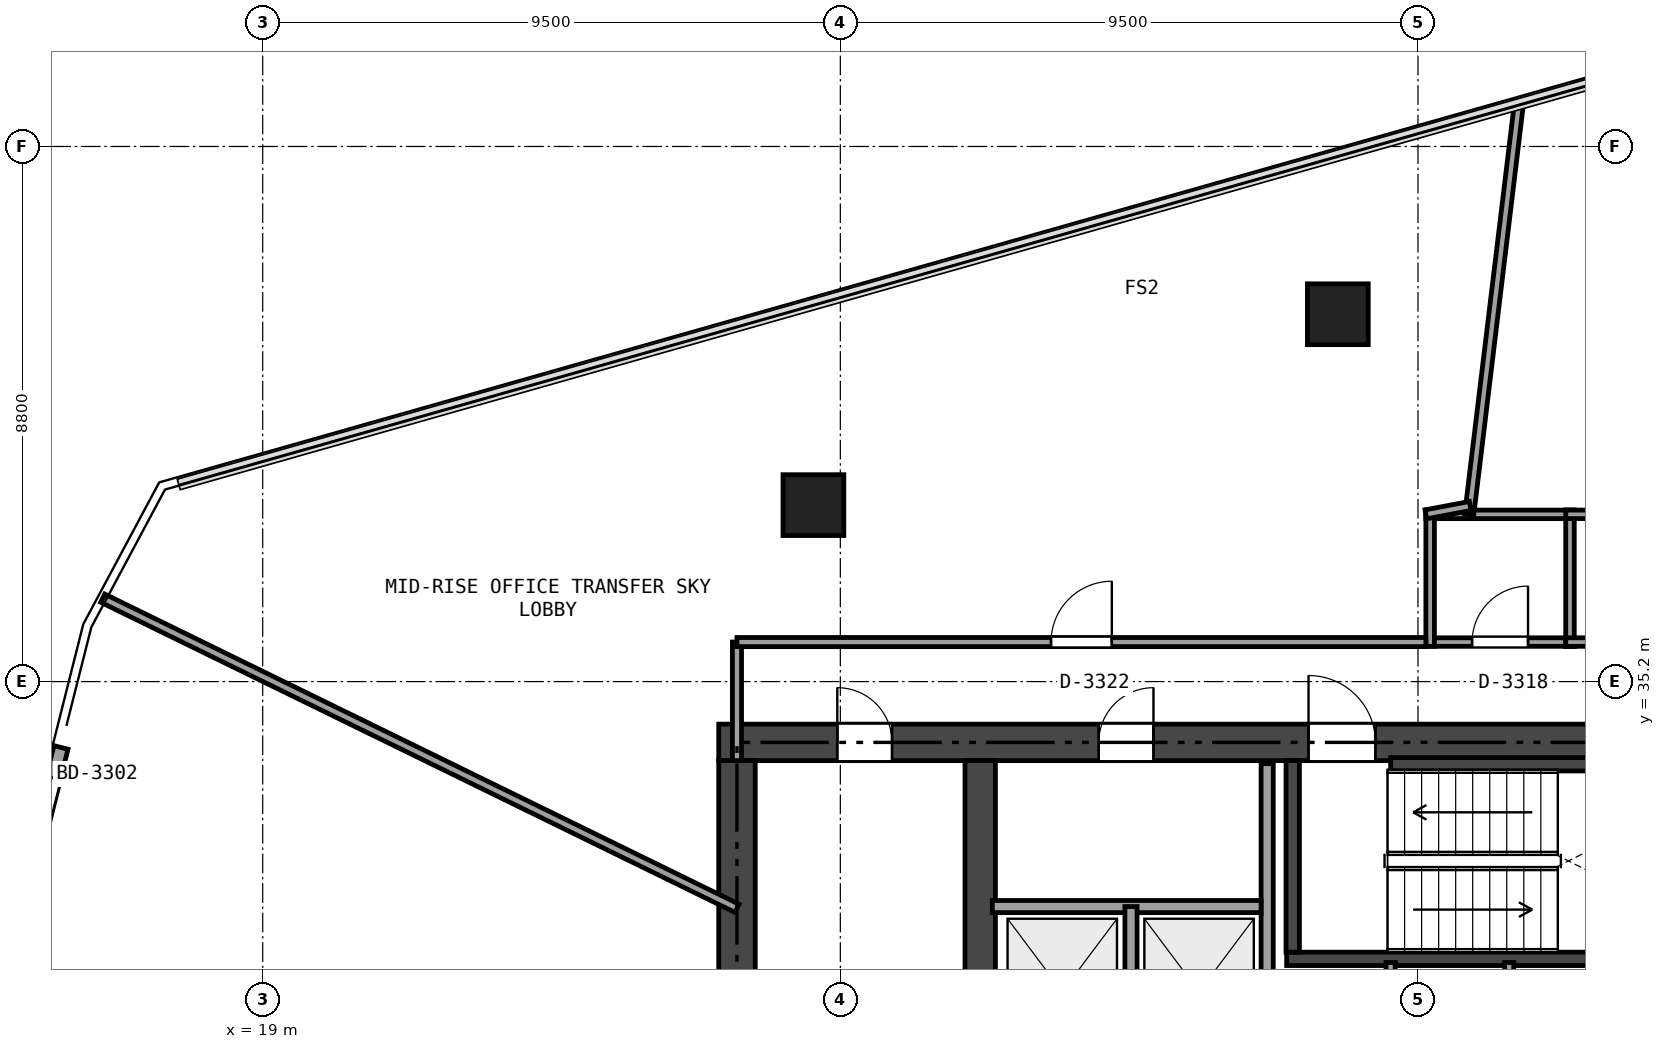
"""IFC4 building model, lengths in metres.
Left out: names, types, materials, properties, quantities, classifications, styles, units other than length and angle.
Written with IfcOpenShell. Run it as: python <this file> out.ifc"""

import sys

from ifc_helpers import new_model, si_unit, direction, frame, frame_2d, origin, origin_2d, place, context, subcontext, project, spatial, rectangle, extrude, element, fill, save


model = new_model("IFC4")
c1 = context("Model", 3, precision=1e-05, world=origin(), true_north=direction((0.0, 1.0)))
c2 = subcontext(c1, "Body", "Model", "MODEL_VIEW")
j1 = project(units=[si_unit("LENGTHUNIT", "METRE"), si_unit("PLANEANGLEUNIT", "RADIAN")], contexts=[c1])
p1 = place(None, origin())
s1 = spatial("IfcSite", under=j1, at=p1, CompositionType="ELEMENT")
p2 = place(p1, origin())
s2 = spatial("IfcBuilding", under=s1, at=p2, CompositionType="ELEMENT")
p3 = place(p2, frame((0.0, 0.0, 125.7)))
s3 = spatial("IfcBuildingStorey", under=s2, at=p3, CompositionType="ELEMENT", Elevation=125.7)
p4 = place(p3, frame((26.5, 34.2, 0.0), z_axis=(0.0, 0.0, 1.0), x_axis=(1.0, 0.0, 0.0)))
e1 = element("IfcWall", 1, at=p4, inside=s3, PredefinedType="SHEAR", context=c2, shape_type="SweptSolid", body=[
    extrude(rectangle(XDim=21.4, YDim=0.6, at=frame_2d((10.7, 0.0))), origin(), (0.0, 0.0, 1.0), 3.32),
])
p5 = place(p4, frame((9.7, 0.0, 0.0)))
e2 = element("IfcOpeningElement", 2, at=p5, cuts=e1, PredefinedType="OPENING", context=c2, shape_type="SweptSolid", body=[
    extrude(rectangle(XDim=1.1, YDim=2.15, at=frame_2d((0.55, 1.075))), frame((0.0, 0.31, 0.0), z_axis=(0.0, -1.0, 0.0), x_axis=(1.0, 0.0, 0.0)), (0.0, 0.0, 1.0), 0.62),
])
p6 = place(p4, frame((1.95, 0.0, 0.0)))
e3 = element("IfcOpeningElement", 3, at=p6, cuts=e1, PredefinedType="OPENING", context=c2, shape_type="SweptSolid", body=[
    extrude(rectangle(XDim=0.9, YDim=2.1, at=frame_2d((0.45, 1.05))), frame((0.0, 0.31, 0.0), z_axis=(0.0, -1.0, 0.0), x_axis=(1.0, 0.0, 0.0)), (0.0, 0.0, 1.0), 0.62),
])
p7 = place(p4, frame((6.25, 0.0, 0.0)))
e4 = element("IfcOpeningElement", 4, at=p7, cuts=e1, PredefinedType="OPENING", context=c2, shape_type="SweptSolid", body=[
    extrude(rectangle(XDim=0.9, YDim=2.1, at=frame_2d((0.45, 1.05))), frame((0.0, 0.31, 0.0), z_axis=(0.0, -1.0, 0.0), x_axis=(1.0, 0.0, 0.0)), (0.0, 0.0, 1.0), 0.62),
])
p8 = place(p3, frame((26.8, 18.9, 0.0), z_axis=(0.0, 0.0, 1.0), x_axis=(0.0, 1.0, 0.0)))
e5 = element("IfcWall", 5, at=p8, inside=s3, PredefinedType="SHEAR", context=c2, shape_type="SweptSolid", body=[
    extrude(rectangle(XDim=15.0, YDim=0.6, at=frame_2d((7.5, 0.0))), origin(), (0.0, 0.0, 1.0), 3.32),
])
p9 = place(p3, frame((30.8, 18.9, 0.0), z_axis=(0.0, 0.0, 1.0), x_axis=(0.0, 1.0, 0.0)))
e6 = element("IfcWall", 6, at=p9, inside=s3, PredefinedType="SHEAR", context=c2, shape_type="SweptSolid", body=[
    extrude(rectangle(XDim=15.0, YDim=0.5, at=frame_2d((7.5, 0.0))), origin(), (0.0, 0.0, 1.0), 3.32),
])
p10 = place(p9, frame((6.6, 0.0, 0.0)))
e7 = element("IfcOpeningElement", 7, at=p10, cuts=e6, PredefinedType="OPENING", context=c2, shape_type="SweptSolid", body=[
    extrude(rectangle(XDim=1.1, YDim=2.15, at=frame_2d((0.55, 1.075))), frame((0.0, 0.26, 0.0), z_axis=(0.0, -1.0, 0.0), x_axis=(1.0, 0.0, 0.0)), (0.0, 0.0, 1.0), 0.52),
])
p11 = place(p9, frame((8.4, 0.0, 0.0)))
e8 = element("IfcOpeningElement", 8, at=p11, cuts=e6, PredefinedType="OPENING", context=c2, shape_type="SweptSolid", body=[
    extrude(rectangle(XDim=0.9, YDim=2.1, at=frame_2d((0.45, 1.05))), frame((0.0, 0.26, 0.0), z_axis=(0.0, -1.0, 0.0), x_axis=(1.0, 0.0, 0.0)), (0.0, 0.0, 1.0), 0.52),
])
p12 = place(p3, frame((35.84, 30.64, 0.0), z_axis=(0.0, 0.0, 1.0), x_axis=(1.0, 0.0, 0.0)))
e9 = element("IfcWall", 9, at=p12, inside=s3, PredefinedType="SHEAR", context=c2, shape_type="SweptSolid", body=[
    extrude(rectangle(XDim=7.61, YDim=0.22, at=frame_2d((3.805, 0.0))), origin(), (0.0, 0.0, 1.0), 3.32),
])
p13 = place(p3, frame((35.94, 30.75, 0.0), z_axis=(0.0, 0.0, 1.0), x_axis=(0.0, 1.0, 0.0)))
e10 = element("IfcWall", 10, at=p13, inside=s3, PredefinedType="SHEAR", context=c2, shape_type="SweptSolid", body=[
    extrude(rectangle(XDim=3.15, YDim=0.22, at=frame_2d((1.575, 0.0))), origin(), (0.0, 0.0, 1.0), 3.32),
])
p14 = place(p3, frame((37.55, 33.84, 0.0), z_axis=(0.0, 0.0, 1.0), x_axis=(1.0, 0.0, 0.0)))
e11 = element("IfcWall", 11, at=p14, inside=s3, PredefinedType="SHEAR", context=c2, shape_type="SweptSolid", body=[
    extrude(rectangle(XDim=5.9, YDim=0.22, at=frame_2d((2.95, 0.0))), origin(), (0.0, 0.0, 1.0), 3.32),
])
for number, where, z_axis, x_axis in (
    (12, (36.682, 41.241, -0.405), (0.0, 0.0, 1.0), (1.0, 0.0, 0.0)),
    (13, (28.057, 38.102, -0.405), (0.0, 0.0, 1.0), (1.0, 0.0, 0.0)),
):
    element("IfcColumn", number, at=place(p3, frame(where, z_axis=z_axis, x_axis=x_axis)), inside=s3, PredefinedType="COLUMN", context=c2, shape_type="SweptSolid", body=[
        extrude(rectangle(XDim=1.0, YDim=1.0, at=origin_2d()), origin(), (0.0, 0.0, 1.0), 3.725),
    ])
p15 = place(p3, frame((14.557, 29.657, 0.0), z_axis=(0.0, 0.0, 1.0), x_axis=(0.244583269574, 0.969628291792, 0.0)))
e14 = element("IfcWall", 14, at=p15, inside=s3, PredefinedType="SOLIDWALL", context=c2, shape_type="SweptSolid", body=[
    extrude(rectangle(XDim=4.6, YDim=0.24, at=frame_2d((2.3, 0.0))), origin(), (0.0, 0.0, 1.0), 3.32),
])
p16 = place(p15, frame((3.08, 0.0, 0.0)))
e15 = element("IfcOpeningElement", 15, at=p16, cuts=e14, PredefinedType="OPENING", context=c2, shape_type="SweptSolid", body=[
    extrude(rectangle(XDim=1.0, YDim=2.15, at=frame_2d((0.5, 1.075))), frame((0.0, 0.13, 0.0), z_axis=(0.0, -1.0, 0.0), x_axis=(1.0, 0.0, 0.0)), (0.0, 0.0, 1.0), 0.26),
])
p17 = place(p3, frame((35.52, 18.95, 0.0), z_axis=(0.0, 0.0, 1.0), x_axis=(0.0, 1.0, 0.0)))
e16 = element("IfcWall", 16, at=p17, inside=s3, PredefinedType="SOLIDWALL", context=c2, shape_type="SweptSolid", body=[
    extrude(rectangle(XDim=14.9, YDim=0.2, at=frame_2d((7.45, 0.0))), origin(), (0.0, 0.0, 1.0), 2.841),
])
p18 = place(p17, frame((7.755, 0.0, 0.0)))
e17 = element("IfcOpeningElement", 17, at=p18, cuts=e16, PredefinedType="OPENING", context=c2, shape_type="SweptSolid", body=[
    extrude(rectangle(XDim=0.95, YDim=2.15, at=frame_2d((0.475, 1.075))), frame((0.0, 0.11, 0.0), z_axis=(0.0, -1.0, 0.0), x_axis=(1.0, 0.0, 0.0)), (0.0, 0.0, 1.0), 0.22),
])
p19 = place(p17, frame((0.6, 0.0, 0.0)))
e18 = element("IfcOpeningElement", 18, at=p19, cuts=e16, PredefinedType="OPENING", context=c2, shape_type="SweptSolid", body=[
    extrude(rectangle(XDim=0.9, YDim=2.1, at=frame_2d((0.45, 1.05))), frame((0.0, 0.11, 0.0), z_axis=(0.0, -1.0, 0.0), x_axis=(1.0, 0.0, 0.0)), (0.0, 0.0, 1.0), 0.22),
])
p20 = place(p3, frame((31.0, 31.5, 0.0), z_axis=(0.0, 0.0, 1.0), x_axis=(1.0, 0.0, 0.0)))
e19 = element("IfcWall", 19, at=p20, inside=s3, PredefinedType="SOLIDWALL", context=c2, shape_type="SweptSolid", body=[
    extrude(rectangle(XDim=4.42, YDim=0.2, at=frame_2d((2.21, 0.0))), origin(), (0.0, 0.0, 1.0), 3.32),
])
p21 = place(p3, frame((33.28, 28.68, 0.0), z_axis=(0.0, 0.0, 1.0), x_axis=(0.0, 1.0, 0.0)))
e20 = element("IfcWall", 20, at=p21, inside=s3, PredefinedType="SOLIDWALL", context=c2, shape_type="SweptSolid", body=[
    extrude(rectangle(XDim=2.82, YDim=0.2, at=frame_2d((1.41, 0.0))), origin(), (0.0, 0.0, 1.0), 3.32),
])
for number, where, z_axis, x_axis in (
    (21, (37.55, 28.15, 0.0), (0.0, 0.0, 1.0), (0.0, 1.0, 0.0)),
    (22, (39.5, 28.15, 0.0), (0.0, 0.0, 1.0), (0.0, 1.0, 0.0)),
):
    element("IfcWall", number, at=place(p3, frame(where, z_axis=z_axis, x_axis=x_axis)), inside=s3, PredefinedType="PARTITIONING", context=c2, shape_type="SweptSolid", body=[
        extrude(rectangle(XDim=2.43, YDim=0.15, at=frame_2d((1.215, 0.0))), origin(), (0.0, 0.0, 1.0), 3.32),
    ])
p22 = place(p3, frame((38.13, 35.85, 0.0), z_axis=(0.0, 0.0, 1.0), x_axis=(1.0, 0.0, 0.0)))
e23 = element("IfcWall", 23, at=p22, inside=s3, PredefinedType="PARTITIONING", context=c2, shape_type="SweptSolid", body=[
    extrude(rectangle(XDim=2.44, YDim=0.14, at=frame_2d((1.22, 0.0))), origin(), (0.0, 0.0, 1.0), 3.32),
])
p23 = place(p22, frame((0.76, 0.0, 0.0)))
e24 = element("IfcOpeningElement", 24, at=p23, cuts=e23, PredefinedType="OPENING", context=c2, shape_type="SweptSolid", body=[
    extrude(rectangle(XDim=0.92, YDim=2.1, at=frame_2d((0.46, 1.05))), frame((0.0, 0.08, 0.0), z_axis=(0.0, -1.0, 0.0), x_axis=(1.0, 0.0, 0.0)), (0.0, 0.0, 1.0), 0.16),
])
p24 = place(p3, frame((40.5, 35.78, 0.0), z_axis=(0.0, 0.0, 1.0), x_axis=(0.0, 1.0, 0.0)))
e25 = element("IfcWall", 25, at=p24, inside=s3, PredefinedType="PARTITIONING", context=c2, shape_type="SweptSolid", body=[
    extrude(rectangle(XDim=2.24, YDim=0.14, at=frame_2d((1.12, 0.0))), origin(), (0.0, 0.0, 1.0), 2.949),
])
p25 = place(p3, frame((40.57, 37.95, 0.0), z_axis=(0.0, 0.0, 1.0), x_axis=(-1.0, 0.0, 0.0)))
e26 = element("IfcWall", 26, at=p25, inside=s3, PredefinedType="PARTITIONING", context=c2, shape_type="SweptSolid", body=[
    extrude(rectangle(XDim=2.44, YDim=0.14, at=frame_2d((1.22, 0.0))), origin(), (0.0, 0.0, 1.0), 2.949),
])
p26 = place(p3, frame((38.2, 38.02, 0.0), z_axis=(0.0, 0.0, 1.0), x_axis=(0.0, -1.0, 0.0)))
e27 = element("IfcWall", 27, at=p26, inside=s3, PredefinedType="PARTITIONING", context=c2, shape_type="SweptSolid", body=[
    extrude(rectangle(XDim=2.24, YDim=0.14, at=frame_2d((1.12, 0.0))), origin(), (0.0, 0.0, 1.0), 2.949),
])
p27 = place(p3, frame((40.43, 35.85, 0.0), z_axis=(0.0, 0.0, 1.0), x_axis=(1.0, 0.0, 0.0)))
e28 = element("IfcWall", 28, at=p27, inside=s3, PredefinedType="PARTITIONING", context=c2, shape_type="SweptSolid", body=[
    extrude(rectangle(XDim=2.44, YDim=0.14, at=frame_2d((1.22, 0.0))), origin(), (0.0, 0.0, 1.0), 3.32),
])
p28 = place(p27, frame((0.76, 0.0, 0.0)))
e29 = element("IfcOpeningElement", 29, at=p28, cuts=e28, PredefinedType="OPENING", context=c2, shape_type="SweptSolid", body=[
    extrude(rectangle(XDim=0.92, YDim=2.1, at=frame_2d((0.46, 1.05))), frame((0.0, 0.08, 0.0), z_axis=(0.0, -1.0, 0.0), x_axis=(1.0, 0.0, 0.0)), (0.0, 0.0, 1.0), 0.16),
])
p29 = place(p3, frame((42.87, 37.95, 0.0), z_axis=(0.0, 0.0, 1.0), x_axis=(-1.0, 0.0, 0.0)))
e30 = element("IfcWall", 30, at=p29, inside=s3, PredefinedType="PARTITIONING", context=c2, shape_type="SweptSolid", body=[
    extrude(rectangle(XDim=2.44, YDim=0.14, at=frame_2d((1.22, 0.0))), origin(), (0.0, 0.0, 1.0), 3.32),
])
p30 = place(p3, frame((39.665, 44.746, 0.0), z_axis=(0.0, 0.0, 1.0), x_axis=(-0.120078943637, -0.992764346305, 0.0)))
e31 = element("IfcWall", 31, at=p30, inside=s3, PredefinedType="PARTITIONING", context=c2, shape_type="SweptSolid", body=[
    extrude(rectangle(XDim=6.846, YDim=0.15, at=frame_2d((3.423, 0.0))), origin(), (0.0, 0.0, 1.0), 2.805),
])
p31 = place(p3, frame((16.369, 36.572, 0.0), z_axis=(0.0, 0.0, 1.0), x_axis=(0.898369979751, -0.43923954681, 0.0)))
e32 = element("IfcWall", 32, at=p31, inside=s3, PredefinedType="PARTITIONING", context=c2, shape_type="SweptSolid", body=[
    extrude(rectangle(XDim=11.611, YDim=0.15, at=frame_2d((5.806, 0.0))), origin(), (0.0, 0.0, 1.0), 2.805),
])
p32 = place(p3, frame((26.8, 33.9, 0.0), z_axis=(0.0, 0.0, 1.0), x_axis=(0.0, 1.0, 0.0)))
e33 = element("IfcWall", 33, at=p32, inside=s3, PredefinedType="PARTITIONING", context=c2, shape_type="SweptSolid", body=[
    extrude(rectangle(XDim=1.95, YDim=0.15, at=frame_2d((0.975, 0.0))), origin(), (0.0, 0.0, 1.0), 2.805),
])
p33 = place(p3, frame((26.8, 35.85, 0.0), z_axis=(0.0, 0.0, 1.0), x_axis=(1.0, 0.0, 0.0)))
e34 = element("IfcWall", 34, at=p33, inside=s3, PredefinedType="PARTITIONING", context=c2, shape_type="SweptSolid", body=[
    extrude(rectangle(XDim=11.33, YDim=0.15, at=frame_2d((5.665, 0.0))), origin(), (0.0, 0.0, 1.0), 2.687),
])
p34 = place(p33, frame((5.165, 0.0, 0.0)))
e35 = element("IfcOpeningElement", 35, at=p34, cuts=e34, PredefinedType="OPENING", context=c2, shape_type="SweptSolid", body=[
    extrude(rectangle(XDim=1.0, YDim=2.15, at=frame_2d((0.5, 1.075))), frame((0.0, 0.085, 0.0), z_axis=(0.0, -1.0, 0.0), x_axis=(1.0, 0.0, 0.0)), (0.0, 0.0, 1.0), 0.17),
])
p35 = place(p3, frame((38.13, 37.95, 0.0), z_axis=(0.0, 0.0, 1.0), x_axis=(0.982622104364, 0.185617348367, 0.0)))
e36 = element("IfcWall", 36, at=p35, inside=s3, PredefinedType="PARTITIONING", context=c2, shape_type="SweptSolid", body=[
    extrude(rectangle(XDim=0.743, YDim=0.15, at=frame_2d((0.372, 0.0))), origin(), (0.0, 0.0, 1.0), 2.949),
])
p36 = place(p16, origin())
e37 = element("IfcDoor", 37, at=p36, inside=s3, OperationType="SINGLE_SWING_RIGHT", PredefinedType="DOOR", context=c2, shape_type="SweptSolid", body=[
    extrude(rectangle(XDim=1.0, YDim=2.15, at=frame_2d((0.5, 1.075))), frame((0.0, 0.025, 0.0), z_axis=(0.0, -1.0, 0.0), x_axis=(1.0, 0.0, 0.0)), (0.0, 0.0, 1.0), 0.05),
])
fill(e15, e37)
p37 = place(p5, origin())
e38 = element("IfcDoor", 38, at=p37, inside=s3, OperationType="SINGLE_SWING_LEFT", PredefinedType="DOOR", context=c2, shape_type="SweptSolid", body=[
    extrude(rectangle(XDim=1.1, YDim=2.15, at=frame_2d((0.55, 1.075))), frame((0.0, 0.025, 0.0), z_axis=(0.0, -1.0, 0.0), x_axis=(1.0, 0.0, 0.0)), (0.0, 0.0, 1.0), 0.05),
])
fill(e2, e38)
p38 = place(p6, origin())
e39 = element("IfcDoor", 39, at=p38, inside=s3, OperationType="SINGLE_SWING_LEFT", PredefinedType="DOOR", context=c2, shape_type="SweptSolid", body=[
    extrude(rectangle(XDim=0.9, YDim=2.1, at=frame_2d((0.45, 1.05))), frame((0.0, 0.025, 0.0), z_axis=(0.0, -1.0, 0.0), x_axis=(1.0, 0.0, 0.0)), (0.0, 0.0, 1.0), 0.05),
])
fill(e3, e39)
p39 = place(p7, origin())
e40 = element("IfcDoor", 40, at=p39, inside=s3, OperationType="SINGLE_SWING_RIGHT", PredefinedType="DOOR", context=c2, shape_type="SweptSolid", body=[
    extrude(rectangle(XDim=0.9, YDim=2.1, at=frame_2d((0.45, 1.05))), frame((0.0, 0.025, 0.0), z_axis=(0.0, -1.0, 0.0), x_axis=(1.0, 0.0, 0.0)), (0.0, 0.0, 1.0), 0.05),
])
fill(e4, e40)
p40 = place(p23, origin())
e41 = element("IfcDoor", 41, at=p40, inside=s3, OperationType="SINGLE_SWING_RIGHT", PredefinedType="DOOR", context=c2, shape_type="SweptSolid", body=[
    extrude(rectangle(XDim=0.92, YDim=2.1, at=frame_2d((0.46, 1.05))), frame((0.0, 0.025, 0.0), z_axis=(0.0, -1.0, 0.0), x_axis=(1.0, 0.0, 0.0)), (0.0, 0.0, 1.0), 0.05),
])
fill(e24, e41)
p41 = place(p34, origin())
e42 = element("IfcDoor", 42, at=p41, inside=s3, OperationType="SINGLE_SWING_RIGHT", PredefinedType="DOOR", context=c2, shape_type="SweptSolid", body=[
    extrude(rectangle(XDim=1.0, YDim=2.15, at=frame_2d((0.5, 1.075))), frame((0.0, 0.025, 0.0), z_axis=(0.0, -1.0, 0.0), x_axis=(1.0, 0.0, 0.0)), (0.0, 0.0, 1.0), 0.05),
])
fill(e35, e42)
save(model, sys.argv[1])
